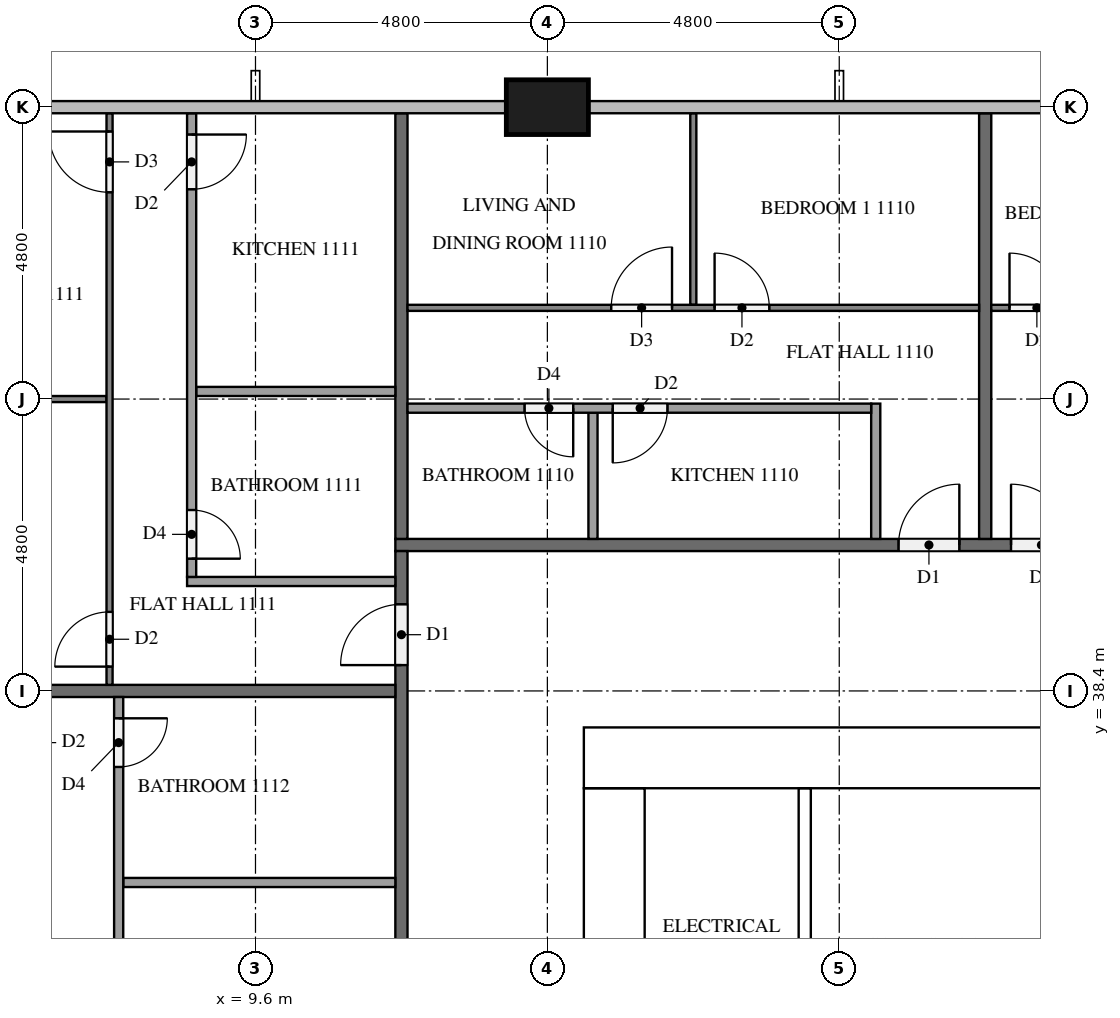
"""IFC4 building model, lengths in metres.
Left out: names, types, materials, properties, quantities, classifications, styles, units other than length and angle.
Written with IfcOpenShell. Run it as: python <this file> out.ifc"""

import sys

from ifc_helpers import new_model, si_unit, direction, frame, frame_2d, origin, origin_2d, place, context, subcontext, project, spatial, rectangle, extrude, element, fill, save


model = new_model("IFC4")
c1 = context("Model", 3, precision=1e-05, world=origin(), true_north=direction((0.0, 1.0)))
c2 = subcontext(c1, "Body", "Model", "MODEL_VIEW")
j1 = project(units=[si_unit("LENGTHUNIT", "METRE"), si_unit("PLANEANGLEUNIT", "RADIAN")], contexts=[c1])
p1 = place(None, origin())
s1 = spatial("IfcSite", under=j1, at=p1, CompositionType="ELEMENT")
p2 = place(p1, origin())
s2 = spatial("IfcBuilding", under=s1, at=p2, CompositionType="ELEMENT")
p3 = place(p2, frame((0.0, 0.0, 46.9)))
s3 = spatial("IfcBuildingStorey", under=s2, at=p3, CompositionType="ELEMENT", Elevation=46.9)
p4 = place(p3, frame((15.0, 37.3, 0.0), z_axis=(0.0, 0.0, 1.0), x_axis=(1.0, 0.0, 0.0)))
e1 = element("IfcWall", 1, at=p4, inside=s3, PredefinedType="SHEAR", context=c2, shape_type="SweptSolid", body=[
    extrude(rectangle(XDim=32.4, YDim=1.0, at=frame_2d((16.2, 0.0))), origin(), (0.0, 0.0, 1.0), 3.2),
])
p5 = place(p4, frame((15.3, 0.0, 0.0)))
e2 = element("IfcOpeningElement", 2, at=p5, cuts=e1, PredefinedType="OPENING", context=c2, shape_type="SweptSolid", body=[
    extrude(rectangle(XDim=1.8, YDim=2.1, at=frame_2d((0.9, 1.05))), frame((0.0, 0.51, 0.0), z_axis=(0.0, -1.0, 0.0), x_axis=(1.0, 0.0, 0.0)), (0.0, 0.0, 1.0), 1.02),
])
p6 = place(p4, frame((1.766, 0.0, 0.0)))
e3 = element("IfcOpeningElement", 3, at=p6, cuts=e1, PredefinedType="OPENING", context=c2, shape_type="SweptSolid", body=[
    extrude(rectangle(XDim=1.0, YDim=2.1, at=frame_2d((0.5, 1.05))), frame((0.0, 0.51, 0.0), z_axis=(0.0, -1.0, 0.0), x_axis=(1.0, 0.0, 0.0)), (0.0, 0.0, 1.0), 1.02),
])
p7 = place(p4, frame((5.241, 0.0, 0.0)))
e4 = element("IfcOpeningElement", 4, at=p7, cuts=e1, PredefinedType="OPENING", context=c2, shape_type="SweptSolid", body=[
    extrude(rectangle(XDim=1.0, YDim=2.1, at=frame_2d((0.5, 1.05))), frame((0.0, 0.51, 0.0), z_axis=(0.0, -1.0, 0.0), x_axis=(1.0, 0.0, 0.0)), (0.0, 0.0, 1.0), 1.02),
])
p8 = place(p3, frame((15.5, 16.0, 0.0), z_axis=(0.0, 0.0, 1.0), x_axis=(0.0, 1.0, 0.0)))
e5 = element("IfcWall", 5, at=p8, inside=s3, PredefinedType="SHEAR", context=c2, shape_type="SweptSolid", body=[
    extrude(rectangle(XDim=20.8, YDim=1.0, at=frame_2d((10.4, 0.0))), origin(), (0.0, 0.0, 1.0), 3.2),
])
p9 = place(p8, frame((4.76, 0.0, 0.0)))
e6 = element("IfcOpeningElement", 6, at=p9, cuts=e5, PredefinedType="OPENING", context=c2, shape_type="SweptSolid", body=[
    extrude(rectangle(XDim=1.2, YDim=2.1, at=frame_2d((0.6, 1.05))), frame((0.0, 0.51, 0.0), z_axis=(0.0, -1.0, 0.0), x_axis=(1.0, 0.0, 0.0)), (0.0, 0.0, 1.0), 1.02),
])
p10 = place(p3, frame((14.4, 48.0, 0.0), z_axis=(0.0, 0.0, 1.0), x_axis=(1.0, 0.0, 0.0)))
e7 = element("IfcColumn", 7, at=p10, inside=s3, PredefinedType="COLUMN", context=c2, shape_type="SweptSolid", body=[
    extrude(rectangle(XDim=1.35, YDim=0.9, at=origin_2d()), origin(), (0.0, 0.0, 1.0), 3.2),
])
p11 = place(p3, frame((18.633, 31.6, 0.0), z_axis=(0.0, 0.0, 1.0), x_axis=(0.0, 1.0, 0.0)))
e8 = element("IfcWall", 8, at=p11, inside=s3, PredefinedType="PARTITIONING", context=c2, shape_type="SweptSolid", body=[
    extrude(rectangle(XDim=5.2, YDim=0.2, at=frame_2d((2.6, 0.0))), origin(), (0.0, 0.0, 1.0), 3.2),
])
p12 = place(p3, frame((11.9, 40.8, 0.0), z_axis=(0.0, 0.0, 1.0), x_axis=(1.0, 0.0, 0.0)))
e9 = element("IfcWall", 9, at=p12, inside=s3, PredefinedType="PARTITIONING", context=c2, shape_type="SweptSolid", body=[
    extrude(rectangle(XDim=38.6, YDim=0.2, at=frame_2d((19.3, 0.0))), origin(), (0.0, 0.0, 1.0), 3.2),
])
p13 = place(p12, frame((22.125, 0.0, 0.0)))
e10 = element("IfcOpeningElement", 10, at=p13, cuts=e9, PredefinedType="OPENING", context=c2, shape_type="SweptSolid", body=[
    extrude(rectangle(XDim=1.0, YDim=2.1, at=frame_2d((0.5, 1.05))), frame((0.0, 0.11, 0.0), z_axis=(0.0, -1.0, 0.0), x_axis=(1.0, 0.0, 0.0)), (0.0, 0.0, 1.0), 0.22),
])
p14 = place(p12, frame((10.125, 0.0, 0.0)))
e11 = element("IfcOpeningElement", 11, at=p14, cuts=e9, PredefinedType="OPENING", context=c2, shape_type="SweptSolid", body=[
    extrude(rectangle(XDim=1.0, YDim=2.1, at=frame_2d((0.5, 1.05))), frame((0.0, 0.11, 0.0), z_axis=(0.0, -1.0, 0.0), x_axis=(1.0, 0.0, 0.0)), (0.0, 0.0, 1.0), 0.22),
])
p15 = place(p12, frame((8.275, 0.0, 0.0)))
e12 = element("IfcOpeningElement", 12, at=p15, cuts=e9, PredefinedType="OPENING", context=c2, shape_type="SweptSolid", body=[
    extrude(rectangle(XDim=1.0, YDim=2.1, at=frame_2d((0.5, 1.05))), frame((0.0, 0.11, 0.0), z_axis=(0.0, -1.0, 0.0), x_axis=(1.0, 0.0, 0.0)), (0.0, 0.0, 1.0), 0.22),
])
p16 = place(p3, frame((12.0, 12.1, 0.0), z_axis=(0.0, 0.0, 1.0), x_axis=(0.0, 1.0, 0.0)))
e13 = element("IfcWall", 13, at=p16, inside=s3, PredefinedType="PARTITIONING", context=c2, shape_type="SweptSolid", body=[
    extrude(rectangle(XDim=28.6, YDim=0.2, at=frame_2d((14.3, 0.0))), origin(), (0.0, 0.0, 1.0), 3.2),
])
p17 = place(p16, frame((26.725, 0.0, 0.0)))
e14 = element("IfcOpeningElement", 14, at=p17, cuts=e13, PredefinedType="OPENING", context=c2, shape_type="SweptSolid", body=[
    extrude(rectangle(XDim=1.0, YDim=2.1, at=frame_2d((0.5, 1.05))), frame((0.0, 0.11, 0.0), z_axis=(0.0, -1.0, 0.0), x_axis=(1.0, 0.0, 0.0)), (0.0, 0.0, 1.0), 0.22),
])
p18 = place(p16, frame((17.125, 0.0, 0.0)))
e15 = element("IfcOpeningElement", 15, at=p18, cuts=e13, PredefinedType="OPENING", context=c2, shape_type="SweptSolid", body=[
    extrude(rectangle(XDim=1.0, YDim=2.1, at=frame_2d((0.5, 1.05))), frame((0.0, 0.11, 0.0), z_axis=(0.0, -1.0, 0.0), x_axis=(1.0, 0.0, 0.0)), (0.0, 0.0, 1.0), 0.22),
])
p19 = place(p16, frame((15.275, 0.0, 0.0)))
e16 = element("IfcOpeningElement", 16, at=p19, cuts=e13, PredefinedType="OPENING", context=c2, shape_type="SweptSolid", body=[
    extrude(rectangle(XDim=1.0, YDim=2.1, at=frame_2d((0.5, 1.05))), frame((0.0, 0.11, 0.0), z_axis=(0.0, -1.0, 0.0), x_axis=(1.0, 0.0, 0.0)), (0.0, 0.0, 1.0), 0.22),
])
p20 = place(p16, frame((5.675, 0.0, 0.0)))
e17 = element("IfcOpeningElement", 17, at=p20, cuts=e13, PredefinedType="OPENING", context=c2, shape_type="SweptSolid", body=[
    extrude(rectangle(XDim=1.0, YDim=2.1, at=frame_2d((0.5, 1.05))), frame((0.0, 0.11, 0.0), z_axis=(0.0, -1.0, 0.0), x_axis=(1.0, 0.0, 0.0)), (0.0, 0.0, 1.0), 0.22),
])
for number, where, z_axis, x_axis in (
    (18, (21.6, 47.9, 0.0), (0.0, 0.0, 1.0), (0.0, -1.0, 0.0)),
    (19, (12.0, 47.9, 0.0), (0.0, 0.0, 1.0), (0.0, -1.0, 0.0)),
):
    element("IfcWall", number, at=place(p3, frame(where, z_axis=z_axis, x_axis=x_axis)), inside=s3, PredefinedType="PARTITIONING", context=c2, shape_type="SweptSolid", body=[
        extrude(rectangle(XDim=7.0, YDim=0.2, at=frame_2d((3.5, 0.0))), origin(), (0.0, 0.0, 1.0), 3.2),
    ])
p21 = place(p3, frame((0.1, 38.4, 0.0), z_axis=(0.0, 0.0, 1.0), x_axis=(1.0, 0.0, 0.0)))
e20 = element("IfcWall", 20, at=p21, inside=s3, PredefinedType="PARTITIONING", context=c2, shape_type="SweptSolid", body=[
    extrude(rectangle(XDim=11.8, YDim=0.2, at=frame_2d((5.9, 0.0))), origin(), (0.0, 0.0, 1.0), 3.2),
])
p22 = place(p3, frame((21.7, 44.7, 0.0), z_axis=(0.0, 0.0, 1.0), x_axis=(1.0, 0.0, 0.0)))
e21 = element("IfcWall", 21, at=p22, inside=s3, PredefinedType="PARTITIONING", context=c2, shape_type="SweptSolid", body=[
    extrude(rectangle(XDim=11.8, YDim=0.1, at=frame_2d((5.9, 0.0))), origin(), (0.0, 0.0, 1.0), 3.2),
])
p23 = place(p22, frame((0.3, 0.0, 0.0)))
e22 = element("IfcOpeningElement", 22, at=p23, cuts=e21, PredefinedType="OPENING", context=c2, shape_type="SweptSolid", body=[
    extrude(rectangle(XDim=0.9, YDim=2.1, at=frame_2d((0.45, 1.05))), frame((0.0, 0.06, 0.0), z_axis=(0.0, -1.0, 0.0), x_axis=(1.0, 0.0, 0.0)), (0.0, 0.0, 1.0), 0.12),
])
p24 = place(p22, frame((10.5, 0.0, 0.0)))
e23 = element("IfcOpeningElement", 23, at=p24, cuts=e21, PredefinedType="OPENING", context=c2, shape_type="SweptSolid", body=[
    extrude(rectangle(XDim=1.0, YDim=2.1, at=frame_2d((0.5, 1.05))), frame((0.0, 0.06, 0.0), z_axis=(0.0, -1.0, 0.0), x_axis=(1.0, 0.0, 0.0)), (0.0, 0.0, 1.0), 0.12),
])
p25 = place(p3, frame((16.8, 44.75, 0.0), z_axis=(0.0, 0.0, 1.0), x_axis=(0.0, 1.0, 0.0)))
e24 = element("IfcWall", 24, at=p25, inside=s3, PredefinedType="PARTITIONING", context=c2, shape_type="SweptSolid", body=[
    extrude(rectangle(XDim=3.15, YDim=0.1, at=frame_2d((1.575, 0.0))), origin(), (0.0, 0.0, 1.0), 3.2),
])
p26 = place(p3, frame((12.1, 44.7, 0.0), z_axis=(0.0, 0.0, 1.0), x_axis=(1.0, 0.0, 0.0)))
e25 = element("IfcWall", 25, at=p26, inside=s3, PredefinedType="PARTITIONING", context=c2, shape_type="SweptSolid", body=[
    extrude(rectangle(XDim=9.4, YDim=0.1, at=frame_2d((4.7, 0.0))), origin(), (0.0, 0.0, 1.0), 3.2),
])
p27 = place(p26, frame((5.05, 0.0, 0.0)))
e26 = element("IfcOpeningElement", 26, at=p27, cuts=e25, PredefinedType="OPENING", context=c2, shape_type="SweptSolid", body=[
    extrude(rectangle(XDim=0.9, YDim=2.1, at=frame_2d((0.45, 1.05))), frame((0.0, 0.06, 0.0), z_axis=(0.0, -1.0, 0.0), x_axis=(1.0, 0.0, 0.0)), (0.0, 0.0, 1.0), 0.12),
])
p28 = place(p26, frame((3.35, 0.0, 0.0)))
e27 = element("IfcOpeningElement", 27, at=p28, cuts=e25, PredefinedType="OPENING", context=c2, shape_type="SweptSolid", body=[
    extrude(rectangle(XDim=1.0, YDim=2.1, at=frame_2d((0.5, 1.05))), frame((0.0, 0.06, 0.0), z_axis=(0.0, -1.0, 0.0), x_axis=(1.0, 0.0, 0.0)), (0.0, 0.0, 1.0), 0.12),
])
p29 = place(p3, frame((15.15, 40.9, 0.0), z_axis=(0.0, 0.0, 1.0), x_axis=(0.0, 1.0, 0.0)))
e28 = element("IfcWall", 28, at=p29, inside=s3, PredefinedType="PARTITIONING", context=c2, shape_type="SweptSolid", body=[
    extrude(rectangle(XDim=2.075, YDim=0.15, at=frame_2d((1.038, 0.0))), origin(), (0.0, 0.0, 1.0), 3.2),
])
p30 = place(p3, frame((19.8, 40.9, 0.0), z_axis=(0.0, 0.0, 1.0), x_axis=(0.0, 1.0, 0.0)))
e29 = element("IfcWall", 29, at=p30, inside=s3, PredefinedType="PARTITIONING", context=c2, shape_type="SweptSolid", body=[
    extrude(rectangle(XDim=2.225, YDim=0.15, at=frame_2d((1.113, 0.0))), origin(), (0.0, 0.0, 1.0), 3.2),
])
p31 = place(p3, frame((19.725, 43.05, 0.0), z_axis=(0.0, 0.0, 1.0), x_axis=(-1.0, 0.0, 0.0)))
e30 = element("IfcWall", 30, at=p31, inside=s3, PredefinedType="PARTITIONING", context=c2, shape_type="SweptSolid", body=[
    extrude(rectangle(XDim=7.625, YDim=0.15, at=frame_2d((3.812, 0.0))), origin(), (0.0, 0.0, 1.0), 3.2),
])
p32 = place(p31, frame((3.35, 0.0, 0.0)))
e31 = element("IfcOpeningElement", 31, at=p32, cuts=e30, PredefinedType="OPENING", context=c2, shape_type="SweptSolid", body=[
    extrude(rectangle(XDim=0.9, YDim=2.1, at=frame_2d((0.45, 1.05))), frame((0.0, 0.085, 0.0), z_axis=(0.0, -1.0, 0.0), x_axis=(1.0, 0.0, 0.0)), (0.0, 0.0, 1.0), 0.17),
])
p33 = place(p31, frame((4.9, 0.0, 0.0)))
e32 = element("IfcOpeningElement", 32, at=p33, cuts=e30, PredefinedType="OPENING", context=c2, shape_type="SweptSolid", body=[
    extrude(rectangle(XDim=0.8, YDim=2.1, at=frame_2d((0.4, 1.05))), frame((0.0, 0.085, 0.0), z_axis=(0.0, -1.0, 0.0), x_axis=(1.0, 0.0, 0.0)), (0.0, 0.0, 1.0), 0.17),
])
p34 = place(p3, frame((7.15, 43.2, 0.0), z_axis=(0.0, 0.0, 1.0), x_axis=(-1.0, 0.0, 0.0)))
e33 = element("IfcWall", 33, at=p34, inside=s3, PredefinedType="PARTITIONING", context=c2, shape_type="SweptSolid", body=[
    extrude(rectangle(XDim=6.525, YDim=0.1, at=frame_2d((3.262, 0.0))), origin(), (0.0, 0.0, 1.0), 3.2),
])
p35 = place(p3, frame((7.2, 38.5, 0.0), z_axis=(0.0, 0.0, 1.0), x_axis=(0.0, 1.0, 0.0)))
e34 = element("IfcWall", 34, at=p35, inside=s3, PredefinedType="PARTITIONING", context=c2, shape_type="SweptSolid", body=[
    extrude(rectangle(XDim=9.4, YDim=0.1, at=frame_2d((4.7, 0.0))), origin(), (0.0, 0.0, 1.0), 3.2),
])
p36 = place(p35, frame((0.3, 0.0, 0.0)))
e35 = element("IfcOpeningElement", 35, at=p36, cuts=e34, PredefinedType="OPENING", context=c2, shape_type="SweptSolid", body=[
    extrude(rectangle(XDim=0.9, YDim=2.1, at=frame_2d((0.45, 1.05))), frame((0.0, 0.06, 0.0), z_axis=(0.0, -1.0, 0.0), x_axis=(1.0, 0.0, 0.0)), (0.0, 0.0, 1.0), 0.12),
])
p37 = place(p35, frame((8.1, 0.0, 0.0)))
e36 = element("IfcOpeningElement", 36, at=p37, cuts=e34, PredefinedType="OPENING", context=c2, shape_type="SweptSolid", body=[
    extrude(rectangle(XDim=1.0, YDim=2.1, at=frame_2d((0.5, 1.05))), frame((0.0, 0.06, 0.0), z_axis=(0.0, -1.0, 0.0), x_axis=(1.0, 0.0, 0.0)), (0.0, 0.0, 1.0), 0.12),
])
p38 = place(p3, frame((11.9, 43.325, 0.0), z_axis=(0.0, 0.0, 1.0), x_axis=(-1.0, 0.0, 0.0)))
e37 = element("IfcWall", 37, at=p38, inside=s3, PredefinedType="PARTITIONING", context=c2, shape_type="SweptSolid", body=[
    extrude(rectangle(XDim=3.275, YDim=0.15, at=frame_2d((1.637, 0.0))), origin(), (0.0, 0.0, 1.0), 3.2),
])
p39 = place(p3, frame((11.9, 40.2, 0.0), z_axis=(0.0, 0.0, 1.0), x_axis=(-1.0, 0.0, 0.0)))
e38 = element("IfcWall", 38, at=p39, inside=s3, PredefinedType="PARTITIONING", context=c2, shape_type="SweptSolid", body=[
    extrude(rectangle(XDim=3.425, YDim=0.15, at=frame_2d((1.712, 0.0))), origin(), (0.0, 0.0, 1.0), 3.2),
])
p40 = place(p3, frame((8.55, 47.9, 0.0), z_axis=(0.0, 0.0, 1.0), x_axis=(0.0, -1.0, 0.0)))
e39 = element("IfcWall", 39, at=p40, inside=s3, PredefinedType="PARTITIONING", context=c2, shape_type="SweptSolid", body=[
    extrude(rectangle(XDim=7.625, YDim=0.15, at=frame_2d((3.812, 0.0))), origin(), (0.0, 0.0, 1.0), 3.2),
])
p41 = place(p40, frame((6.525, 0.0, 0.0)))
e40 = element("IfcOpeningElement", 40, at=p41, cuts=e39, PredefinedType="OPENING", context=c2, shape_type="SweptSolid", body=[
    extrude(rectangle(XDim=0.8, YDim=2.1, at=frame_2d((0.4, 1.05))), frame((0.0, 0.085, 0.0), z_axis=(0.0, -1.0, 0.0), x_axis=(1.0, 0.0, 0.0)), (0.0, 0.0, 1.0), 0.17),
])
p42 = place(p40, frame((0.35, 0.0, 0.0)))
e41 = element("IfcOpeningElement", 41, at=p42, cuts=e39, PredefinedType="OPENING", context=c2, shape_type="SweptSolid", body=[
    extrude(rectangle(XDim=0.9, YDim=2.1, at=frame_2d((0.45, 1.05))), frame((0.0, 0.085, 0.0), z_axis=(0.0, -1.0, 0.0), x_axis=(1.0, 0.0, 0.0)), (0.0, 0.0, 1.0), 0.17),
])
p43 = place(p3, frame((11.9, 35.25, 0.0), z_axis=(0.0, 0.0, 1.0), x_axis=(-1.0, 0.0, 0.0)))
e42 = element("IfcWall", 42, at=p43, inside=s3, PredefinedType="PARTITIONING", context=c2, shape_type="SweptSolid", body=[
    extrude(rectangle(XDim=4.475, YDim=0.15, at=frame_2d((2.237, 0.0))), origin(), (0.0, 0.0, 1.0), 3.2),
])
p44 = place(p3, frame((7.35, 38.3, 0.0), z_axis=(0.0, 0.0, 1.0), x_axis=(0.0, -1.0, 0.0)))
e43 = element("IfcWall", 43, at=p44, inside=s3, PredefinedType="PARTITIONING", context=c2, shape_type="SweptSolid", body=[
    extrude(rectangle(XDim=7.625, YDim=0.15, at=frame_2d((3.812, 0.0))), origin(), (0.0, 0.0, 1.0), 3.2),
])
p45 = place(p44, frame((6.425, 0.0, 0.0)))
e44 = element("IfcOpeningElement", 44, at=p45, cuts=e43, PredefinedType="OPENING", context=c2, shape_type="SweptSolid", body=[
    extrude(rectangle(XDim=0.9, YDim=2.1, at=frame_2d((0.45, 1.05))), frame((0.0, 0.085, 0.0), z_axis=(0.0, -1.0, 0.0), x_axis=(1.0, 0.0, 0.0)), (0.0, 0.0, 1.0), 0.17),
])
p46 = place(p44, frame((0.35, 0.0, 0.0)))
e45 = element("IfcOpeningElement", 45, at=p46, cuts=e43, PredefinedType="OPENING", context=c2, shape_type="SweptSolid", body=[
    extrude(rectangle(XDim=0.8, YDim=2.1, at=frame_2d((0.4, 1.05))), frame((0.0, 0.085, 0.0), z_axis=(0.0, -1.0, 0.0), x_axis=(1.0, 0.0, 0.0)), (0.0, 0.0, 1.0), 0.17),
])
p47 = place(p6, origin())
e46 = element("IfcDoor", 46, at=p47, inside=s3, OperationType="SINGLE_SWING_RIGHT", PredefinedType="DOOR", context=c2, shape_type="SweptSolid", body=[
    extrude(rectangle(XDim=1.0, YDim=2.1, at=frame_2d((0.5, 1.05))), frame((0.0, 0.025, 0.0), z_axis=(0.0, -1.0, 0.0), x_axis=(1.0, 0.0, 0.0)), (0.0, 0.0, 1.0), 0.05),
])
fill(e3, e46)
p48 = place(p7, origin())
e47 = element("IfcDoor", 47, at=p48, inside=s3, OperationType="SINGLE_SWING_LEFT", PredefinedType="DOOR", context=c2, shape_type="SweptSolid", body=[
    extrude(rectangle(XDim=1.0, YDim=2.1, at=frame_2d((0.5, 1.05))), frame((0.0, 0.025, 0.0), z_axis=(0.0, -1.0, 0.0), x_axis=(1.0, 0.0, 0.0)), (0.0, 0.0, 1.0), 0.05),
])
fill(e4, e47)
p49 = place(p14, origin())
e48 = element("IfcDoor", 48, at=p49, inside=s3, OperationType="SINGLE_SWING_LEFT", PredefinedType="DOOR", context=c2, shape_type="SweptSolid", body=[
    extrude(rectangle(XDim=1.0, YDim=2.1, at=frame_2d((0.5, 1.05))), frame((0.0, 0.025, 0.0), z_axis=(0.0, -1.0, 0.0), x_axis=(1.0, 0.0, 0.0)), (0.0, 0.0, 1.0), 0.05),
])
fill(e11, e48)
p50 = place(p15, origin())
e49 = element("IfcDoor", 49, at=p50, inside=s3, OperationType="SINGLE_SWING_RIGHT", PredefinedType="DOOR", context=c2, shape_type="SweptSolid", body=[
    extrude(rectangle(XDim=1.0, YDim=2.1, at=frame_2d((0.5, 1.05))), frame((0.0, 0.025, 0.0), z_axis=(0.0, -1.0, 0.0), x_axis=(1.0, 0.0, 0.0)), (0.0, 0.0, 1.0), 0.05),
])
fill(e12, e49)
p51 = place(p17, origin())
e50 = element("IfcDoor", 50, at=p51, inside=s3, OperationType="SINGLE_SWING_LEFT", PredefinedType="DOOR", context=c2, shape_type="SweptSolid", body=[
    extrude(rectangle(XDim=1.0, YDim=2.1, at=frame_2d((0.5, 1.05))), frame((0.0, 0.025, 0.0), z_axis=(0.0, -1.0, 0.0), x_axis=(1.0, 0.0, 0.0)), (0.0, 0.0, 1.0), 0.05),
])
fill(e14, e50)
p52 = place(p23, origin())
e51 = element("IfcDoor", 51, at=p52, inside=s3, OperationType="SINGLE_SWING_LEFT", PredefinedType="DOOR", context=c2, shape_type="SweptSolid", body=[
    extrude(rectangle(XDim=0.9, YDim=2.1, at=frame_2d((0.45, 1.05))), frame((0.0, 0.025, 0.0), z_axis=(0.0, -1.0, 0.0), x_axis=(1.0, 0.0, 0.0)), (0.0, 0.0, 1.0), 0.05),
])
fill(e22, e51)
p53 = place(p27, origin())
e52 = element("IfcDoor", 52, at=p53, inside=s3, OperationType="SINGLE_SWING_LEFT", PredefinedType="DOOR", context=c2, shape_type="SweptSolid", body=[
    extrude(rectangle(XDim=0.9, YDim=2.1, at=frame_2d((0.45, 1.05))), frame((0.0, 0.025, 0.0), z_axis=(0.0, -1.0, 0.0), x_axis=(1.0, 0.0, 0.0)), (0.0, 0.0, 1.0), 0.05),
])
fill(e26, e52)
p54 = place(p28, origin())
e53 = element("IfcDoor", 53, at=p54, inside=s3, OperationType="SINGLE_SWING_RIGHT", PredefinedType="DOOR", context=c2, shape_type="SweptSolid", body=[
    extrude(rectangle(XDim=1.0, YDim=2.1, at=frame_2d((0.5, 1.05))), frame((0.0, 0.025, 0.0), z_axis=(0.0, -1.0, 0.0), x_axis=(1.0, 0.0, 0.0)), (0.0, 0.0, 1.0), 0.05),
])
fill(e27, e53)
p55 = place(p32, origin())
e54 = element("IfcDoor", 54, at=p55, inside=s3, OperationType="SINGLE_SWING_RIGHT", PredefinedType="DOOR", context=c2, shape_type="SweptSolid", body=[
    extrude(rectangle(XDim=0.9, YDim=2.1, at=frame_2d((0.45, 1.05))), frame((0.0, 0.025, 0.0), z_axis=(0.0, -1.0, 0.0), x_axis=(1.0, 0.0, 0.0)), (0.0, 0.0, 1.0), 0.05),
])
fill(e31, e54)
p56 = place(p33, origin())
e55 = element("IfcDoor", 55, at=p56, inside=s3, OperationType="SINGLE_SWING_LEFT", PredefinedType="DOOR", context=c2, shape_type="SweptSolid", body=[
    extrude(rectangle(XDim=0.8, YDim=2.1, at=frame_2d((0.4, 1.05))), frame((0.0, 0.025, 0.0), z_axis=(0.0, -1.0, 0.0), x_axis=(1.0, 0.0, 0.0)), (0.0, 0.0, 1.0), 0.05),
])
fill(e32, e55)
p57 = place(p36, origin())
e56 = element("IfcDoor", 56, at=p57, inside=s3, OperationType="SINGLE_SWING_LEFT", PredefinedType="DOOR", context=c2, shape_type="SweptSolid", body=[
    extrude(rectangle(XDim=0.9, YDim=2.1, at=frame_2d((0.45, 1.05))), frame((0.0, 0.025, 0.0), z_axis=(0.0, -1.0, 0.0), x_axis=(1.0, 0.0, 0.0)), (0.0, 0.0, 1.0), 0.05),
])
fill(e35, e56)
p58 = place(p37, origin())
e57 = element("IfcDoor", 57, at=p58, inside=s3, OperationType="SINGLE_SWING_RIGHT", PredefinedType="DOOR", context=c2, shape_type="SweptSolid", body=[
    extrude(rectangle(XDim=1.0, YDim=2.1, at=frame_2d((0.5, 1.05))), frame((0.0, 0.025, 0.0), z_axis=(0.0, -1.0, 0.0), x_axis=(1.0, 0.0, 0.0)), (0.0, 0.0, 1.0), 0.05),
])
fill(e36, e57)
p59 = place(p41, origin())
e58 = element("IfcDoor", 58, at=p59, inside=s3, OperationType="SINGLE_SWING_RIGHT", PredefinedType="DOOR", context=c2, shape_type="SweptSolid", body=[
    extrude(rectangle(XDim=0.8, YDim=2.1, at=frame_2d((0.4, 1.05))), frame((0.0, 0.025, 0.0), z_axis=(0.0, -1.0, 0.0), x_axis=(1.0, 0.0, 0.0)), (0.0, 0.0, 1.0), 0.05),
])
fill(e40, e58)
p60 = place(p42, origin())
e59 = element("IfcDoor", 59, at=p60, inside=s3, OperationType="SINGLE_SWING_LEFT", PredefinedType="DOOR", context=c2, shape_type="SweptSolid", body=[
    extrude(rectangle(XDim=0.9, YDim=2.1, at=frame_2d((0.45, 1.05))), frame((0.0, 0.025, 0.0), z_axis=(0.0, -1.0, 0.0), x_axis=(1.0, 0.0, 0.0)), (0.0, 0.0, 1.0), 0.05),
])
fill(e41, e59)
p61 = place(p46, origin())
e60 = element("IfcDoor", 60, at=p61, inside=s3, OperationType="SINGLE_SWING_LEFT", PredefinedType="DOOR", context=c2, shape_type="SweptSolid", body=[
    extrude(rectangle(XDim=0.8, YDim=2.1, at=frame_2d((0.4, 1.05))), frame((0.0, 0.025, 0.0), z_axis=(0.0, -1.0, 0.0), x_axis=(1.0, 0.0, 0.0)), (0.0, 0.0, 1.0), 0.05),
])
fill(e45, e60)
save(model, sys.argv[1])
